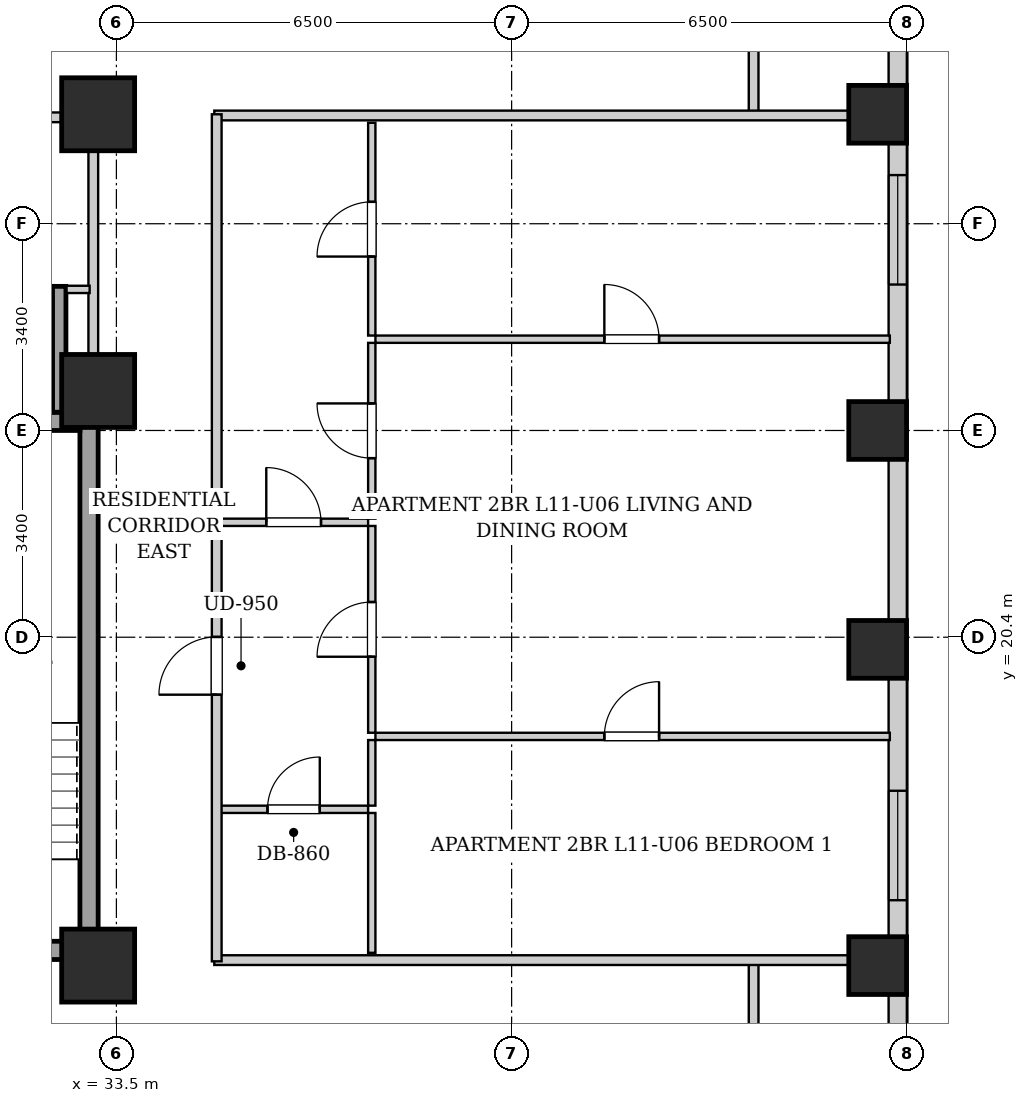
"""IFC4 building model, lengths in metres.
Left out: names, types, materials, properties, quantities, classifications, styles, units other than length and angle.
Written with IfcOpenShell. Run it as: python <this file> out.ifc"""

import sys

from ifc_helpers import new_model, si_unit, direction, frame, frame_2d, origin, origin_2d, place, context, subcontext, project, spatial, rectangle, extrude, element, fill, save


model = new_model("IFC4")
c1 = context("Model", 3, precision=1e-05, world=origin(), true_north=direction((0.0, 1.0)))
c2 = subcontext(c1, "Body", "Model", "MODEL_VIEW")
j1 = project(units=[si_unit("LENGTHUNIT", "METRE"), si_unit("PLANEANGLEUNIT", "RADIAN")], contexts=[c1])
p1 = place(None, origin())
s1 = spatial("IfcSite", under=j1, at=p1, CompositionType="ELEMENT")
p2 = place(p1, origin())
s2 = spatial("IfcBuilding", under=s1, at=p2, CompositionType="ELEMENT")
p3 = place(p2, frame((0.0, 0.0, 45.0)))
s3 = spatial("IfcBuildingStorey", under=s2, at=p3, CompositionType="ELEMENT", Elevation=45.0)
for number, where, z_axis, x_axis in (
    (1, (46.02, 15.0, 0.0), (0.0, 0.0, 1.0), (1.0, 0.0, 0.0)),
    (2, (46.02, 20.2, 0.0), (0.0, 0.0, 1.0), (1.0, 0.0, 0.0)),
    (3, (46.02, 23.8, 0.0), (0.0, 0.0, 1.0), (1.0, 0.0, 0.0)),
    (4, (46.02, 29.0, 0.0), (0.0, 0.0, 1.0), (1.0, 0.0, 0.0)),
):
    element("IfcColumn", number, at=place(p3, frame(where, z_axis=z_axis, x_axis=x_axis)), inside=s3, PredefinedType="COLUMN", context=c2, shape_type="SweptSolid", body=[
        extrude(rectangle(XDim=0.95, YDim=0.95, at=origin_2d()), origin(), (0.0, 0.0, 1.0), 3.2),
    ])
for number, where, z_axis, x_axis in (
    (5, (33.2, 15.0, 0.0), (0.0, 0.0, 1.0), (1.0, 0.0, 0.0)),
    (6, (33.2, 29.0, 0.0), (0.0, 0.0, 1.0), (1.0, 0.0, 0.0)),
    (7, (33.2, 24.45, 0.0), (0.0, 0.0, 1.0), (1.0, 0.0, 0.0)),
):
    element("IfcColumn", number, at=place(p3, frame(where, z_axis=z_axis, x_axis=x_axis)), inside=s3, PredefinedType="COLUMN", context=c2, shape_type="SweptSolid", body=[
        extrude(rectangle(XDim=1.2, YDim=1.2, at=origin_2d()), origin(), (0.0, 0.0, 1.0), 3.2),
    ])
p4 = place(p3, frame((46.35, 45.1, 0.0), z_axis=(0.0, 0.0, 1.0), x_axis=(0.0, -1.0, 0.0)))
e8 = element("IfcWall", 8, at=p4, inside=s3, PredefinedType="SOLIDWALL", context=c2, shape_type="SweptSolid", body=[
    extrude(rectangle(XDim=42.6, YDim=0.3, at=frame_2d((21.3, 0.0))), origin(), (0.0, 0.0, 1.0), 1.975),
])
p5 = place(p4, frame((37.575, 0.0, 0.55)))
e9 = element("IfcOpeningElement", 9, at=p5, cuts=e8, PredefinedType="OPENING", context=c2, shape_type="SweptSolid", body=[
    extrude(rectangle(XDim=1.8, YDim=1.2, at=frame_2d((0.9, 0.6))), frame((0.0, 0.16, 0.0), z_axis=(0.0, -1.0, 0.0), x_axis=(1.0, 0.0, 0.0)), (0.0, 0.0, 1.0), 0.32),
])
p6 = place(p4, frame((34.85, 0.0, 0.55)))
e10 = element("IfcOpeningElement", 10, at=p6, cuts=e8, PredefinedType="OPENING", context=c2, shape_type="SweptSolid", body=[
    extrude(rectangle(XDim=1.35, YDim=1.2, at=frame_2d((0.675, 0.6))), frame((0.0, 0.16, 0.0), z_axis=(0.0, -1.0, 0.0), x_axis=(1.0, 0.0, 0.0)), (0.0, 0.0, 1.0), 0.32),
])
p7 = place(p4, frame((3.665, 0.0, 0.55)))
e11 = element("IfcOpeningElement", 11, at=p7, cuts=e8, PredefinedType="OPENING", context=c2, shape_type="SweptSolid", body=[
    extrude(rectangle(XDim=1.8, YDim=1.2, at=frame_2d((0.9, 0.6))), frame((0.0, 0.16, 0.0), z_axis=(0.0, -1.0, 0.0), x_axis=(1.0, 0.0, 0.0)), (0.0, 0.0, 1.0), 0.32),
])
p8 = place(p4, frame((1.185, 0.0, 0.55)))
e12 = element("IfcOpeningElement", 12, at=p8, cuts=e8, PredefinedType="OPENING", context=c2, shape_type="SweptSolid", body=[
    extrude(rectangle(XDim=1.35, YDim=1.2, at=frame_2d((0.675, 0.6))), frame((0.0, 0.16, 0.0), z_axis=(0.0, -1.0, 0.0), x_axis=(1.0, 0.0, 0.0)), (0.0, 0.0, 1.0), 0.32),
])
p9 = place(p4, frame((27.225, 0.0, 0.55)))
e13 = element("IfcOpeningElement", 13, at=p9, cuts=e8, PredefinedType="OPENING", context=c2, shape_type="SweptSolid", body=[
    extrude(rectangle(XDim=1.8, YDim=1.2, at=frame_2d((0.9, 0.6))), frame((0.0, 0.16, 0.0), z_axis=(0.0, -1.0, 0.0), x_axis=(1.0, 0.0, 0.0)), (0.0, 0.0, 1.0), 0.32),
])
p10 = place(p4, frame((17.1, 0.0, 0.55)))
e14 = element("IfcOpeningElement", 14, at=p10, cuts=e8, PredefinedType="OPENING", context=c2, shape_type="SweptSolid", body=[
    extrude(rectangle(XDim=1.8, YDim=1.2, at=frame_2d((0.9, 0.6))), frame((0.0, 0.16, 0.0), z_axis=(0.0, -1.0, 0.0), x_axis=(1.0, 0.0, 0.0)), (0.0, 0.0, 1.0), 0.32),
])
p11 = place(p3, frame((33.05, 15.1, 0.0), z_axis=(0.0, 0.0, 1.0), x_axis=(0.0, 1.0, 0.0)))
e15 = element("IfcWall", 15, at=p11, inside=s3, PredefinedType="SHEAR", context=c2, shape_type="SweptSolid", body=[
    extrude(rectangle(XDim=9.0, YDim=0.3, at=frame_2d((4.5, 0.0))), origin(), (0.0, 0.0, 1.0), 2.94),
])
p12 = place(p3, frame((30.05, 23.95, 0.0), z_axis=(0.0, 0.0, 1.0), x_axis=(1.0, 0.0, 0.0)))
e16 = element("IfcWall", 16, at=p12, inside=s3, PredefinedType="SHEAR", context=c2, shape_type="SweptSolid", body=[
    extrude(rectangle(XDim=2.85, YDim=0.3, at=frame_2d((1.425, 0.0))), origin(), (0.0, 0.0, 1.0), 2.94),
])
p13 = place(p3, frame((30.05, 15.25, 0.0), z_axis=(0.0, 0.0, 1.0), x_axis=(1.0, 0.0, 0.0)))
e17 = element("IfcWall", 17, at=p13, inside=s3, PredefinedType="SHEAR", context=c2, shape_type="SweptSolid", body=[
    extrude(rectangle(XDim=2.85, YDim=0.3, at=frame_2d((1.425, 0.0))), origin(), (0.0, 0.0, 1.0), 2.94),
])
p14 = place(p13, frame((0.86, 0.0, 0.0)))
e18 = element("IfcOpeningElement", 18, at=p14, cuts=e17, PredefinedType="OPENING", context=c2, shape_type="SweptSolid", body=[
    extrude(rectangle(XDim=1.1, YDim=2.05, at=frame_2d((0.55, 1.025))), frame((0.0, 0.16, 0.0), z_axis=(0.0, -1.0, 0.0), x_axis=(1.0, 0.0, 0.0)), (0.0, 0.0, 1.0), 0.32),
])
p15 = place(p3, frame((32.56, 24.1, 0.0), z_axis=(0.0, 0.0, 1.0), x_axis=(0.0, 1.0, 0.0)))
e19 = element("IfcWall", 19, at=p15, inside=s3, PredefinedType="SHEAR", context=c2, shape_type="SweptSolid", body=[
    extrude(rectangle(XDim=2.07, YDim=0.22, at=frame_2d((1.035, 0.0))), origin(), (0.0, 0.0, 1.0), 2.94),
])
p16 = place(p3, frame((33.12, 24.12, 0.0), z_axis=(0.0, 0.0, 1.0), x_axis=(0.0, 1.0, 0.0)))
e20 = element("IfcWall", 20, at=p16, inside=s3, PredefinedType="PARTITIONING", context=c2, shape_type="SweptSolid", body=[
    extrude(rectangle(XDim=4.76, YDim=0.16, at=frame_2d((2.38, 0.0))), origin(), (0.0, 0.0, 1.0), 2.94),
])
p17 = place(p3, frame((32.68, 26.12, 0.0), z_axis=(0.0, 0.0, 1.0), x_axis=(1.0, 0.0, 0.0)))
e21 = element("IfcWall", 21, at=p17, inside=s3, PredefinedType="PARTITIONING", context=c2, shape_type="SweptSolid", body=[
    extrude(rectangle(XDim=0.38, YDim=0.12, at=frame_2d((0.19, 0.0))), origin(), (0.0, 0.0, 1.0), 2.94),
])
p18 = place(p3, frame((30.08, 28.95, 0.0), z_axis=(0.0, 0.0, 1.0), x_axis=(1.0, 0.0, 0.0)))
e22 = element("IfcWall", 22, at=p18, inside=s3, PredefinedType="PARTITIONING", context=c2, shape_type="SweptSolid", body=[
    extrude(rectangle(XDim=2.96, YDim=0.16, at=frame_2d((1.48, 0.0))), origin(), (0.0, 0.0, 1.0), 2.94),
])
p19 = place(p18, frame((1.045, 0.0, 0.0)))
e23 = element("IfcOpeningElement", 23, at=p19, cuts=e22, PredefinedType="OPENING", context=c2, shape_type="SweptSolid", body=[
    extrude(rectangle(XDim=0.86, YDim=2.05, at=frame_2d((0.43, 1.025))), frame((0.0, 0.09, 0.0), z_axis=(0.0, -1.0, 0.0), x_axis=(1.0, 0.0, 0.0)), (0.0, 0.0, 1.0), 0.18),
])
for number, where, z_axis, x_axis in (
    (24, (43.98, 13.35, 0.0), (0.0, 0.0, 1.0), (0.0, 1.0, 0.0)),
    (25, (43.98, 28.98, 0.0), (0.0, 0.0, 1.0), (0.0, 1.0, 0.0)),
):
    element("IfcWall", number, at=place(p3, frame(where, z_axis=z_axis, x_axis=x_axis)), inside=s3, PredefinedType="PARTITIONING", context=c2, shape_type="SweptSolid", body=[
        extrude(rectangle(XDim=1.74, YDim=0.16, at=frame_2d((0.87, 0.0))), origin(), (0.0, 0.0, 1.0), 2.94),
    ])
for number, where, z_axis, x_axis in (
    (26, (35.11, 15.09, 0.0), (0.0, 0.0, 1.0), (1.0, 0.0, 0.0)),
    (27, (35.11, 28.98, 0.0), (0.0, 0.0, 1.0), (1.0, 0.0, 0.0)),
):
    element("IfcWall", number, at=place(p3, frame(where, z_axis=z_axis, x_axis=x_axis)), inside=s3, PredefinedType="PARTITIONING", context=c2, shape_type="SweptSolid", body=[
        extrude(rectangle(XDim=11.11, YDim=0.16, at=frame_2d((5.555, 0.0))), origin(), (0.0, 0.0, 1.0), 2.155),
    ])
p20 = place(p3, frame((35.19, 22.29, 0.0), z_axis=(0.0, 0.0, 1.0), x_axis=(1.0, 0.0, 0.0)))
e28 = element("IfcWall", 28, at=p20, inside=s3, PredefinedType="PARTITIONING", context=c2, shape_type="SweptSolid", body=[
    extrude(rectangle(XDim=2.45, YDim=0.12, at=frame_2d((1.225, 0.0))), origin(), (0.0, 0.0, 1.0), 2.94),
])
p21 = place(p20, frame((0.775, 0.0, 0.0)))
e29 = element("IfcOpeningElement", 29, at=p21, cuts=e28, PredefinedType="OPENING", context=c2, shape_type="SweptSolid", body=[
    extrude(rectangle(XDim=0.9, YDim=2.05, at=frame_2d((0.45, 1.025))), frame((0.0, 0.07, 0.0), z_axis=(0.0, -1.0, 0.0), x_axis=(1.0, 0.0, 0.0)), (0.0, 0.0, 1.0), 0.14),
])
p22 = place(p3, frame((37.7, 22.35, 0.0), z_axis=(0.0, 0.0, 1.0), x_axis=(0.0, 1.0, 0.0)))
e30 = element("IfcWall", 30, at=p22, inside=s3, PredefinedType="PARTITIONING", context=c2, shape_type="SweptSolid", body=[
    extrude(rectangle(XDim=2.891, YDim=0.12, at=frame_2d((1.445, 0.0))), origin(), (0.0, 0.0, 1.0), 2.94),
])
p23 = place(p22, frame((0.995, 0.0, 0.0)))
e31 = element("IfcOpeningElement", 31, at=p23, cuts=e30, PredefinedType="OPENING", context=c2, shape_type="SweptSolid", body=[
    extrude(rectangle(XDim=0.9, YDim=2.05, at=frame_2d((0.45, 1.025))), frame((0.0, 0.07, 0.0), z_axis=(0.0, -1.0, 0.0), x_axis=(1.0, 0.0, 0.0)), (0.0, 0.0, 1.0), 0.14),
])
p24 = place(p3, frame((37.7, 25.361, 0.0), z_axis=(0.0, 0.0, 1.0), x_axis=(0.0, 1.0, 0.0)))
e32 = element("IfcWall", 32, at=p24, inside=s3, PredefinedType="PARTITIONING", context=c2, shape_type="SweptSolid", body=[
    extrude(rectangle(XDim=3.499, YDim=0.12, at=frame_2d((1.75, 0.0))), origin(), (0.0, 0.0, 1.0), 2.94),
])
p25 = place(p24, frame((1.299, 0.0, 0.0)))
e33 = element("IfcOpeningElement", 33, at=p25, cuts=e32, PredefinedType="OPENING", context=c2, shape_type="SweptSolid", body=[
    extrude(rectangle(XDim=0.9, YDim=2.05, at=frame_2d((0.45, 1.025))), frame((0.0, 0.07, 0.0), z_axis=(0.0, -1.0, 0.0), x_axis=(1.0, 0.0, 0.0)), (0.0, 0.0, 1.0), 0.14),
])
p26 = place(p3, frame((35.19, 17.57, 0.0), z_axis=(0.0, 0.0, 1.0), x_axis=(1.0, 0.0, 0.0)))
e34 = element("IfcWall", 34, at=p26, inside=s3, PredefinedType="PARTITIONING", context=c2, shape_type="SweptSolid", body=[
    extrude(rectangle(XDim=2.45, YDim=0.12, at=frame_2d((1.225, 0.0))), origin(), (0.0, 0.0, 1.0), 2.94),
])
p27 = place(p26, frame((0.795, 0.0, 0.0)))
e35 = element("IfcOpeningElement", 35, at=p27, cuts=e34, PredefinedType="OPENING", context=c2, shape_type="SweptSolid", body=[
    extrude(rectangle(XDim=0.86, YDim=2.05, at=frame_2d((0.43, 1.025))), frame((0.0, 0.07, 0.0), z_axis=(0.0, -1.0, 0.0), x_axis=(1.0, 0.0, 0.0)), (0.0, 0.0, 1.0), 0.14),
])
p28 = place(p3, frame((37.7, 15.21, 0.0), z_axis=(0.0, 0.0, 1.0), x_axis=(0.0, 1.0, 0.0)))
e36 = element("IfcWall", 36, at=p28, inside=s3, PredefinedType="PARTITIONING", context=c2, shape_type="SweptSolid", body=[
    extrude(rectangle(XDim=2.3, YDim=0.12, at=frame_2d((1.15, 0.0))), origin(), (0.0, 0.0, 1.0), 2.94),
])
p29 = place(p3, frame((37.7, 17.63, 0.0), z_axis=(0.0, 0.0, 1.0), x_axis=(0.0, 1.0, 0.0)))
e37 = element("IfcWall", 37, at=p29, inside=s3, PredefinedType="PARTITIONING", context=c2, shape_type="SweptSolid", body=[
    extrude(rectangle(XDim=1.079, YDim=0.12, at=frame_2d((0.54, 0.0))), origin(), (0.0, 0.0, 1.0), 2.94),
])
p30 = place(p3, frame((37.7, 18.829, 0.0), z_axis=(0.0, 0.0, 1.0), x_axis=(0.0, 1.0, 0.0)))
e38 = element("IfcWall", 38, at=p30, inside=s3, PredefinedType="PARTITIONING", context=c2, shape_type="SweptSolid", body=[
    extrude(rectangle(XDim=3.401, YDim=0.12, at=frame_2d((1.7, 0.0))), origin(), (0.0, 0.0, 1.0), 2.94),
])
p31 = place(p30, frame((1.25, 0.0, 0.0)))
e39 = element("IfcOpeningElement", 39, at=p31, cuts=e38, PredefinedType="OPENING", context=c2, shape_type="SweptSolid", body=[
    extrude(rectangle(XDim=0.9, YDim=2.05, at=frame_2d((0.45, 1.025))), frame((0.0, 0.07, 0.0), z_axis=(0.0, -1.0, 0.0), x_axis=(1.0, 0.0, 0.0)), (0.0, 0.0, 1.0), 0.14),
])
p32 = place(p3, frame((37.76, 18.769, 0.0), z_axis=(0.0, 0.0, 1.0), x_axis=(1.0, 0.0, 0.0)))
e40 = element("IfcWall", 40, at=p32, inside=s3, PredefinedType="PARTITIONING", context=c2, shape_type="SweptSolid", body=[
    extrude(rectangle(XDim=8.46, YDim=0.12, at=frame_2d((4.23, 0.0))), origin(), (0.0, 0.0, 1.0), 2.94),
])
p33 = place(p32, frame((3.765, 0.0, 0.0)))
e41 = element("IfcOpeningElement", 41, at=p33, cuts=e40, PredefinedType="OPENING", context=c2, shape_type="SweptSolid", body=[
    extrude(rectangle(XDim=0.9, YDim=2.05, at=frame_2d((0.45, 1.025))), frame((0.0, 0.07, 0.0), z_axis=(0.0, -1.0, 0.0), x_axis=(1.0, 0.0, 0.0)), (0.0, 0.0, 1.0), 0.14),
])
p34 = place(p3, frame((37.76, 25.301, 0.0), z_axis=(0.0, 0.0, 1.0), x_axis=(1.0, 0.0, 0.0)))
e42 = element("IfcWall", 42, at=p34, inside=s3, PredefinedType="PARTITIONING", context=c2, shape_type="SweptSolid", body=[
    extrude(rectangle(XDim=8.46, YDim=0.12, at=frame_2d((4.23, 0.0))), origin(), (0.0, 0.0, 1.0), 2.94),
])
p35 = place(p34, frame((3.765, 0.0, 0.0)))
e43 = element("IfcOpeningElement", 43, at=p35, cuts=e42, PredefinedType="OPENING", context=c2, shape_type="SweptSolid", body=[
    extrude(rectangle(XDim=0.9, YDim=2.05, at=frame_2d((0.45, 1.025))), frame((0.0, 0.07, 0.0), z_axis=(0.0, -1.0, 0.0), x_axis=(1.0, 0.0, 0.0)), (0.0, 0.0, 1.0), 0.14),
])
p36 = place(p3, frame((35.15, 15.07, 0.0), z_axis=(0.0, 0.0, 1.0), x_axis=(0.0, 1.0, 0.0)))
e44 = element("IfcWall", 44, at=p36, inside=s3, PredefinedType="PARTITIONING", context=c2, shape_type="SweptSolid", body=[
    extrude(rectangle(XDim=13.93, YDim=0.16, at=frame_2d((6.965, 0.0))), origin(), (0.0, 0.0, 1.0), 2.94),
])
p37 = place(p36, frame((4.385, 0.0, 0.0)))
e45 = element("IfcOpeningElement", 45, at=p37, cuts=e44, PredefinedType="OPENING", context=c2, shape_type="SweptSolid", body=[
    extrude(rectangle(XDim=0.95, YDim=2.1, at=frame_2d((0.475, 1.05))), frame((0.0, 0.09, 0.0), z_axis=(0.0, -1.0, 0.0), x_axis=(1.0, 0.0, 0.0)), (0.0, 0.0, 1.0), 0.18),
])
p38 = place(p21, origin())
e46 = element("IfcDoor", 46, at=p38, inside=s3, OperationType="SINGLE_SWING_LEFT", PredefinedType="DOOR", context=c2, shape_type="SweptSolid", body=[
    extrude(rectangle(XDim=0.9, YDim=2.05, at=frame_2d((0.45, 1.025))), frame((0.0, 0.025, 0.0), z_axis=(0.0, -1.0, 0.0), x_axis=(1.0, 0.0, 0.0)), (0.0, 0.0, 1.0), 0.05),
])
fill(e29, e46)
p39 = place(p23, origin())
e47 = element("IfcDoor", 47, at=p39, inside=s3, OperationType="SINGLE_SWING_RIGHT", PredefinedType="DOOR", context=c2, shape_type="SweptSolid", body=[
    extrude(rectangle(XDim=0.9, YDim=2.05, at=frame_2d((0.45, 1.025))), frame((0.0, 0.025, 0.0), z_axis=(0.0, -1.0, 0.0), x_axis=(1.0, 0.0, 0.0)), (0.0, 0.0, 1.0), 0.05),
])
fill(e31, e47)
p40 = place(p25, origin())
e48 = element("IfcDoor", 48, at=p40, inside=s3, OperationType="SINGLE_SWING_LEFT", PredefinedType="DOOR", context=c2, shape_type="SweptSolid", body=[
    extrude(rectangle(XDim=0.9, YDim=2.05, at=frame_2d((0.45, 1.025))), frame((0.0, 0.025, 0.0), z_axis=(0.0, -1.0, 0.0), x_axis=(1.0, 0.0, 0.0)), (0.0, 0.0, 1.0), 0.05),
])
fill(e33, e48)
p41 = place(p27, origin())
e49 = element("IfcDoor", 49, at=p41, inside=s3, OperationType="SINGLE_SWING_RIGHT", PredefinedType="DOOR", context=c2, shape_type="SweptSolid", body=[
    extrude(rectangle(XDim=0.86, YDim=2.05, at=frame_2d((0.43, 1.025))), frame((0.0, 0.025, 0.0), z_axis=(0.0, -1.0, 0.0), x_axis=(1.0, 0.0, 0.0)), (0.0, 0.0, 1.0), 0.05),
])
fill(e35, e49)
p42 = place(p31, origin())
e50 = element("IfcDoor", 50, at=p42, inside=s3, OperationType="SINGLE_SWING_LEFT", PredefinedType="DOOR", context=c2, shape_type="SweptSolid", body=[
    extrude(rectangle(XDim=0.9, YDim=2.05, at=frame_2d((0.45, 1.025))), frame((0.0, 0.025, 0.0), z_axis=(0.0, -1.0, 0.0), x_axis=(1.0, 0.0, 0.0)), (0.0, 0.0, 1.0), 0.05),
])
fill(e39, e50)
p43 = place(p33, origin())
e51 = element("IfcDoor", 51, at=p43, inside=s3, OperationType="SINGLE_SWING_RIGHT", PredefinedType="DOOR", context=c2, shape_type="SweptSolid", body=[
    extrude(rectangle(XDim=0.9, YDim=2.05, at=frame_2d((0.45, 1.025))), frame((0.0, 0.025, 0.0), z_axis=(0.0, -1.0, 0.0), x_axis=(1.0, 0.0, 0.0)), (0.0, 0.0, 1.0), 0.05),
])
fill(e41, e51)
p44 = place(p35, origin())
e52 = element("IfcDoor", 52, at=p44, inside=s3, OperationType="SINGLE_SWING_LEFT", PredefinedType="DOOR", context=c2, shape_type="SweptSolid", body=[
    extrude(rectangle(XDim=0.9, YDim=2.05, at=frame_2d((0.45, 1.025))), frame((0.0, 0.025, 0.0), z_axis=(0.0, -1.0, 0.0), x_axis=(1.0, 0.0, 0.0)), (0.0, 0.0, 1.0), 0.05),
])
fill(e43, e52)
p45 = place(p37, origin())
e53 = element("IfcDoor", 53, at=p45, inside=s3, OperationType="SINGLE_SWING_LEFT", PredefinedType="DOOR", context=c2, shape_type="SweptSolid", body=[
    extrude(rectangle(XDim=0.95, YDim=2.1, at=frame_2d((0.475, 1.05))), frame((0.0, 0.025, 0.0), z_axis=(0.0, -1.0, 0.0), x_axis=(1.0, 0.0, 0.0)), (0.0, 0.0, 1.0), 0.05),
])
fill(e45, e53)
p46 = place(p9, origin())
e54 = element("IfcWindow", 54, at=p46, inside=s3, PartitioningType="DOUBLE_PANEL_VERTICAL", PredefinedType="WINDOW", context=c2, shape_type="SweptSolid", body=[
    extrude(rectangle(XDim=1.8, YDim=1.2, at=frame_2d((0.9, 0.6))), frame((0.0, 0.03, 0.0), z_axis=(0.0, -1.0, 0.0), x_axis=(1.0, 0.0, 0.0)), (0.0, 0.0, 1.0), 0.06),
])
fill(e13, e54)
p47 = place(p10, origin())
e55 = element("IfcWindow", 55, at=p47, inside=s3, PartitioningType="DOUBLE_PANEL_VERTICAL", PredefinedType="WINDOW", context=c2, shape_type="SweptSolid", body=[
    extrude(rectangle(XDim=1.8, YDim=1.2, at=frame_2d((0.9, 0.6))), frame((0.0, 0.03, 0.0), z_axis=(0.0, -1.0, 0.0), x_axis=(1.0, 0.0, 0.0)), (0.0, 0.0, 1.0), 0.06),
])
fill(e14, e55)
save(model, sys.argv[1])
